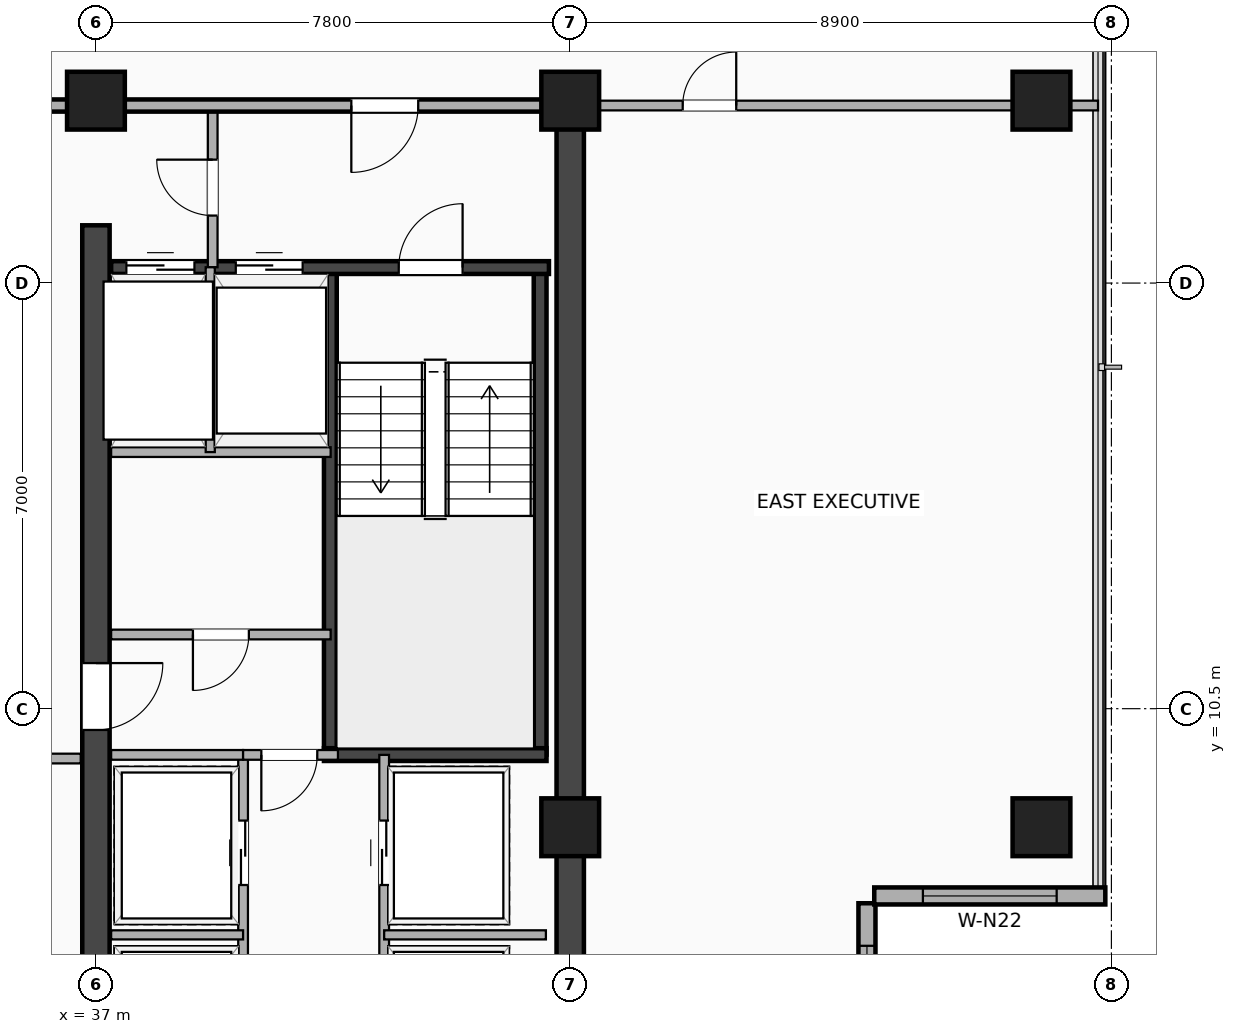
"""IFC4 building model, lengths in metres.
Left out: names, types, materials, properties, quantities, classifications, styles, units other than length and angle.
Written with IfcOpenShell. Run it as: python <this file> out.ifc"""

import sys

from ifc_helpers import new_model, si_unit, direction, frame, frame_2d, origin, origin_2d, place, context, subcontext, project, spatial, rectangle, extrude, element, fill, save


model = new_model("IFC4")
c1 = context("Model", 3, precision=1e-05, world=origin(), true_north=direction((0.0, 1.0)))
c2 = subcontext(c1, "Body", "Model", "MODEL_VIEW")
j1 = project(units=[si_unit("LENGTHUNIT", "METRE"), si_unit("PLANEANGLEUNIT", "RADIAN")], contexts=[c1])
p1 = place(None, origin())
s1 = spatial("IfcSite", under=j1, at=p1, CompositionType="ELEMENT")
p2 = place(p1, origin())
s2 = spatial("IfcBuilding", under=s1, at=p2, CompositionType="ELEMENT")
p3 = place(p2, frame((0.0, 0.0, 224.9)))
s3 = spatial("IfcBuildingStorey", under=s2, at=p3, CompositionType="ELEMENT", Elevation=224.9)
p4 = place(p3, frame((44.8, 3.5, 0.0), z_axis=(0.0, 0.0, 1.0), x_axis=(0.0, 1.0, 0.0)))
e1 = element("IfcWall", 1, at=p4, inside=s3, PredefinedType="SHEAR", context=c2, shape_type="SweptSolid", body=[
    extrude(rectangle(XDim=16.9, YDim=0.45, at=frame_2d((8.45, 0.0))), origin(), (0.0, 0.0, 1.0), 3.26),
])
p5 = place(p3, frame((37.0, 3.5, 0.0), z_axis=(0.0, 0.0, 1.0), x_axis=(0.0, 1.0, 0.0)))
e2 = element("IfcWall", 2, at=p5, inside=s3, PredefinedType="SHEAR", context=c2, shape_type="SweptSolid", body=[
    extrude(rectangle(XDim=14.95, YDim=0.45, at=frame_2d((7.475, 0.0))), origin(), (0.0, 0.0, 1.0), 3.26),
])
p6 = place(p5, frame((6.65, 0.0, 0.0)))
e3 = element("IfcOpeningElement", 3, at=p6, cuts=e2, PredefinedType="OPENING", context=c2, shape_type="SweptSolid", body=[
    extrude(rectangle(XDim=1.1, YDim=2.15, at=frame_2d((0.55, 1.075))), frame((0.0, 0.235, 0.0), z_axis=(0.0, -1.0, 0.0), x_axis=(1.0, 0.0, 0.0)), (0.0, 0.0, 1.0), 0.47),
])
for number, where, z_axis, x_axis in (
    (4, (40.855, 9.745, 0.0), (0.0, 0.0, 1.0), (0.0, 1.0, 0.0)),
    (5, (44.305, 9.745, 0.0), (0.0, 0.0, 1.0), (0.0, 1.0, 0.0)),
):
    element("IfcWall", number, at=place(p3, frame(where, z_axis=z_axis, x_axis=x_axis)), inside=s3, PredefinedType="SHEAR", context=c2, shape_type="SweptSolid", body=[
        extrude(rectangle(XDim=8.01, YDim=0.21, at=frame_2d((4.005, 0.0))), origin(), (0.0, 0.0, 1.0), 3.26),
    ])
p7 = place(p3, frame((40.75, 9.745, 0.0), z_axis=(0.0, 0.0, 1.0), x_axis=(1.0, 0.0, 0.0)))
e6 = element("IfcWall", 6, at=p7, inside=s3, PredefinedType="SHEAR", context=c2, shape_type="SweptSolid", body=[
    extrude(rectangle(XDim=3.66, YDim=0.21, at=frame_2d((1.83, 0.0))), origin(), (0.0, 0.0, 1.0), 3.26),
])
p8 = place(p3, frame((37.25, 17.755, 0.0), z_axis=(0.0, 0.0, 1.0), x_axis=(1.0, 0.0, 0.0)))
e7 = element("IfcWall", 7, at=p8, inside=s3, PredefinedType="SHEAR", context=c2, shape_type="SweptSolid", body=[
    extrude(rectangle(XDim=7.2, YDim=0.21, at=frame_2d((3.6, 0.0))), origin(), (0.0, 0.0, 1.0), 3.26),
])
p9 = place(p8, frame((0.25, 0.0, 0.0)))
e8 = element("IfcOpeningElement", 8, at=p9, cuts=e7, PredefinedType="OPENING", context=c2, shape_type="SweptSolid", body=[
    extrude(rectangle(XDim=1.12, YDim=2.2, at=frame_2d((0.56, 1.1))), frame((0.0, 0.115, 0.0), z_axis=(0.0, -1.0, 0.0), x_axis=(1.0, 0.0, 0.0)), (0.0, 0.0, 1.0), 0.23),
])
p10 = place(p8, frame((2.05, 0.0, 0.0)))
e9 = element("IfcOpeningElement", 9, at=p10, cuts=e7, PredefinedType="OPENING", context=c2, shape_type="SweptSolid", body=[
    extrude(rectangle(XDim=1.1, YDim=2.18, at=frame_2d((0.55, 1.09))), frame((0.0, 0.115, 0.0), z_axis=(0.0, -1.0, 0.0), x_axis=(1.0, 0.0, 0.0)), (0.0, 0.0, 1.0), 0.23),
])
p11 = place(p8, frame((5.78, 0.0, 0.0), z_axis=(0.0, 0.0, 1.0), x_axis=(-1.0, 0.0, 0.0)))
e10 = element("IfcOpeningElement", 10, at=p11, cuts=e7, PredefinedType="OPENING", context=c2, shape_type="SweptSolid", body=[
    extrude(rectangle(XDim=1.05, YDim=2.15, at=frame_2d((0.525, 1.075))), frame((0.0, 0.115, 0.0), z_axis=(0.0, -1.0, 0.0), x_axis=(1.0, 0.0, 0.0)), (0.0, 0.0, 1.0), 0.23),
])
for number, where, z_axis, x_axis in (
    (11, (44.8, 8.55, -0.24), (0.0, 0.0, 1.0), (1.0, 0.0, 0.0)),
    (12, (37.0, 20.5, -0.24), (0.0, 0.0, 1.0), (1.0, 0.0, 0.0)),
    (13, (44.8, 20.5, -0.24), (0.0, 0.0, 1.0), (1.0, 0.0, 0.0)),
    (14, (52.55, 8.55, -0.24), (0.0, 0.0, 1.0), (1.0, 0.0, 0.0)),
    (15, (52.55, 20.5, -0.24), (0.0, 0.0, 1.0), (1.0, 0.0, 0.0)),
):
    element("IfcColumn", number, at=place(p3, frame(where, z_axis=z_axis, x_axis=x_axis)), inside=s3, PredefinedType="COLUMN", context=c2, shape_type="SweptSolid", body=[
        extrude(rectangle(XDim=0.95, YDim=0.95, at=origin_2d()), origin(), (0.0, 0.0, 1.0), 3.5),
    ])
p12 = place(p3, frame((49.68, 3.5, 0.0), z_axis=(0.0, 0.0, 1.0), x_axis=(0.0, 1.0, 0.0)))
e16 = element("IfcWall", 16, at=p12, inside=s3, PredefinedType="SOLIDWALL", context=c2, shape_type="SweptSolid", body=[
    extrude(rectangle(XDim=3.8, YDim=0.28, at=frame_2d((1.9, 0.0))), origin(), (0.0, 0.0, 1.0), 3.26),
])
p13 = place(p12, frame((0.7, 0.0, 0.85)))
e17 = element("IfcOpeningElement", 17, at=p13, cuts=e16, PredefinedType="OPENING", context=c2, shape_type="SweptSolid", body=[
    extrude(rectangle(XDim=2.4, YDim=1.65, at=frame_2d((1.2, 0.825))), frame((0.0, 0.15, 0.0), z_axis=(0.0, -1.0, 0.0), x_axis=(1.0, 0.0, 0.0)), (0.0, 0.0, 1.0), 0.3),
])
p14 = place(p3, frame((49.8, 7.42, 0.0), z_axis=(0.0, 0.0, 1.0), x_axis=(1.0, 0.0, 0.0)))
e18 = element("IfcWall", 18, at=p14, inside=s3, PredefinedType="SOLIDWALL", context=c2, shape_type="SweptSolid", body=[
    extrude(rectangle(XDim=3.8, YDim=0.28, at=frame_2d((1.9, 0.0))), origin(), (0.0, 0.0, 1.0), 3.26),
])
p15 = place(p14, frame((0.8, 0.0, 0.85)))
e19 = element("IfcOpeningElement", 19, at=p15, cuts=e18, PredefinedType="OPENING", context=c2, shape_type="SweptSolid", body=[
    extrude(rectangle(XDim=2.2, YDim=1.65, at=frame_2d((1.1, 0.825))), frame((0.0, 0.15, 0.0), z_axis=(0.0, -1.0, 0.0), x_axis=(1.0, 0.0, 0.0)), (0.0, 0.0, 1.0), 0.3),
])
p16 = place(p3, frame((38.92, 17.76, 0.0), z_axis=(0.0, 0.0, 1.0), x_axis=(0.0, 1.0, 0.0)))
e20 = element("IfcWall", 20, at=p16, inside=s3, PredefinedType="PARTITIONING", context=c2, shape_type="SweptSolid", body=[
    extrude(rectangle(XDim=2.66, YDim=0.16, at=frame_2d((1.33, 0.0))), origin(), (0.0, 0.0, 1.0), 2.706),
])
p17 = place(p16, frame((1.77, 0.0, 0.0), z_axis=(0.0, 0.0, 1.0), x_axis=(-1.0, 0.0, 0.0)))
e21 = element("IfcOpeningElement", 21, at=p17, cuts=e20, PredefinedType="OPENING", context=c2, shape_type="SweptSolid", body=[
    extrude(rectangle(XDim=0.92, YDim=2.08, at=frame_2d((0.46, 1.04))), frame((0.0, 0.09, 0.0), z_axis=(0.0, -1.0, 0.0), x_axis=(1.0, 0.0, 0.0)), (0.0, 0.0, 1.0), 0.18),
])
p18 = place(p3, frame((37.25, 14.72, 0.0), z_axis=(0.0, 0.0, 1.0), x_axis=(1.0, 0.0, 0.0)))
e22 = element("IfcWall", 22, at=p18, inside=s3, PredefinedType="PARTITIONING", context=c2, shape_type="SweptSolid", body=[
    extrude(rectangle(XDim=3.61, YDim=0.16, at=frame_2d((1.805, 0.0))), origin(), (0.0, 0.0, 1.0), 3.26),
])
p19 = place(p3, frame((38.88, 14.72, 0.0), z_axis=(0.0, 0.0, 1.0), x_axis=(0.0, 1.0, 0.0)))
e23 = element("IfcWall", 23, at=p19, inside=s3, PredefinedType="PARTITIONING", context=c2, shape_type="SweptSolid", body=[
    extrude(rectangle(XDim=3.04, YDim=0.15, at=frame_2d((1.52, 0.0))), origin(), (0.0, 0.0, 1.0), 3.26),
])
p20 = place(p3, frame((29.2, 20.42, 0.0), z_axis=(0.0, 0.0, 1.0), x_axis=(1.0, 0.0, 0.0)))
e24 = element("IfcWall", 24, at=p20, inside=s3, PredefinedType="PARTITIONING", context=c2, shape_type="SweptSolid", body=[
    extrude(rectangle(XDim=7.8, YDim=0.2, at=frame_2d((3.9, 0.0))), origin(), (0.0, 0.0, 1.0), 2.472),
])
p21 = place(p20, frame((3.409, 0.0, 0.0)))
e25 = element("IfcOpeningElement", 25, at=p21, cuts=e24, PredefinedType="OPENING", context=c2, shape_type="SweptSolid", body=[
    extrude(rectangle(XDim=1.1, YDim=2.15, at=frame_2d((0.55, 1.075))), frame((0.0, 0.11, 0.0), z_axis=(0.0, -1.0, 0.0), x_axis=(1.0, 0.0, 0.0)), (0.0, 0.0, 1.0), 0.22),
])
p22 = place(p3, frame((37.0, 20.42, 0.0), z_axis=(0.0, 0.0, 1.0), x_axis=(1.0, 0.0, 0.0)))
e26 = element("IfcWall", 26, at=p22, inside=s3, PredefinedType="PARTITIONING", context=c2, shape_type="SweptSolid", body=[
    extrude(rectangle(XDim=7.45, YDim=0.2, at=frame_2d((3.725, 0.0))), origin(), (0.0, 0.0, 1.0), 2.472),
])
p23 = place(p22, frame((4.2, 0.0, 0.0)))
e27 = element("IfcOpeningElement", 27, at=p23, cuts=e26, PredefinedType="OPENING", context=c2, shape_type="SweptSolid", body=[
    extrude(rectangle(XDim=1.1, YDim=2.15, at=frame_2d((0.55, 1.075))), frame((0.0, 0.11, 0.0), z_axis=(0.0, -1.0, 0.0), x_axis=(1.0, 0.0, 0.0)), (0.0, 0.0, 1.0), 0.22),
])
p24 = place(p3, frame((37.25, 11.72, 0.0), z_axis=(0.0, 0.0, 1.0), x_axis=(1.0, 0.0, 0.0)))
e28 = element("IfcWall", 28, at=p24, inside=s3, PredefinedType="PARTITIONING", context=c2, shape_type="SweptSolid", body=[
    extrude(rectangle(XDim=3.61, YDim=0.16, at=frame_2d((1.805, 0.0))), origin(), (0.0, 0.0, 1.0), 3.26),
])
p25 = place(p24, frame((1.345, 0.0, 0.0)))
e29 = element("IfcOpeningElement", 29, at=p25, cuts=e28, PredefinedType="OPENING", context=c2, shape_type="SweptSolid", body=[
    extrude(rectangle(XDim=0.92, YDim=2.08, at=frame_2d((0.46, 1.04))), frame((0.0, 0.09, 0.0), z_axis=(0.0, -1.0, 0.0), x_axis=(1.0, 0.0, 0.0)), (0.0, 0.0, 1.0), 0.18),
])
p26 = place(p3, frame((39.42, 3.9, 0.0), z_axis=(0.0, 0.0, 1.0), x_axis=(0.0, 1.0, 0.0)))
e30 = element("IfcWall", 30, at=p26, inside=s3, PredefinedType="PARTITIONING", context=c2, shape_type="SweptSolid", body=[
    extrude(rectangle(XDim=5.84, YDim=0.16, at=frame_2d((2.92, 0.0))), origin(), (0.0, 0.0, 1.0), 3.26),
])
p27 = place(p26, frame((1.86, 0.0, 0.0), z_axis=(0.0, 0.0, 1.0), x_axis=(-1.0, 0.0, 0.0)))
e31 = element("IfcOpeningElement", 31, at=p27, cuts=e30, PredefinedType="OPENING", context=c2, shape_type="SweptSolid", body=[
    extrude(rectangle(XDim=1.06, YDim=2.16, at=frame_2d((0.53, 1.08))), frame((0.0, 0.09, 0.0), z_axis=(0.0, -1.0, 0.0), x_axis=(1.0, 0.0, 0.0)), (0.0, 0.0, 1.0), 0.18),
])
p28 = place(p26, frame((4.76, 0.0, 0.0), z_axis=(0.0, 0.0, 1.0), x_axis=(-1.0, 0.0, 0.0)))
e32 = element("IfcOpeningElement", 32, at=p28, cuts=e30, PredefinedType="OPENING", context=c2, shape_type="SweptSolid", body=[
    extrude(rectangle(XDim=1.06, YDim=2.16, at=frame_2d((0.53, 1.08))), frame((0.0, 0.09, 0.0), z_axis=(0.0, -1.0, 0.0), x_axis=(1.0, 0.0, 0.0)), (0.0, 0.0, 1.0), 0.18),
])
p29 = place(p3, frame((41.74, 3.9, 0.0), z_axis=(0.0, 0.0, 1.0), x_axis=(0.0, 1.0, 0.0)))
e33 = element("IfcWall", 33, at=p29, inside=s3, PredefinedType="PARTITIONING", context=c2, shape_type="SweptSolid", body=[
    extrude(rectangle(XDim=5.84, YDim=0.16, at=frame_2d((2.92, 0.0))), origin(), (0.0, 0.0, 1.0), 3.26),
])
p30 = place(p29, frame((0.8, 0.0, 0.0)))
e34 = element("IfcOpeningElement", 34, at=p30, cuts=e33, PredefinedType="OPENING", context=c2, shape_type="SweptSolid", body=[
    extrude(rectangle(XDim=1.06, YDim=2.16, at=frame_2d((0.53, 1.08))), frame((0.0, 0.09, 0.0), z_axis=(0.0, -1.0, 0.0), x_axis=(1.0, 0.0, 0.0)), (0.0, 0.0, 1.0), 0.18),
])
p31 = place(p29, frame((3.7, 0.0, 0.0)))
e35 = element("IfcOpeningElement", 35, at=p31, cuts=e33, PredefinedType="OPENING", context=c2, shape_type="SweptSolid", body=[
    extrude(rectangle(XDim=1.06, YDim=2.16, at=frame_2d((0.53, 1.08))), frame((0.0, 0.09, 0.0), z_axis=(0.0, -1.0, 0.0), x_axis=(1.0, 0.0, 0.0)), (0.0, 0.0, 1.0), 0.18),
])
p32 = place(p3, frame((37.25, 6.78, 0.0), z_axis=(0.0, 0.0, 1.0), x_axis=(1.0, 0.0, 0.0)))
e36 = element("IfcWall", 36, at=p32, inside=s3, PredefinedType="PARTITIONING", context=c2, shape_type="SweptSolid", body=[
    extrude(rectangle(XDim=2.17, YDim=0.15, at=frame_2d((1.085, 0.0))), origin(), (0.0, 0.0, 1.0), 3.26),
])
p33 = place(p3, frame((41.74, 6.78, 0.0), z_axis=(0.0, 0.0, 1.0), x_axis=(1.0, 0.0, 0.0)))
e37 = element("IfcWall", 37, at=p33, inside=s3, PredefinedType="PARTITIONING", context=c2, shape_type="SweptSolid", body=[
    extrude(rectangle(XDim=2.66, YDim=0.15, at=frame_2d((1.33, 0.0))), origin(), (0.0, 0.0, 1.0), 2.472),
])
p34 = place(p3, frame((37.25, 9.74, 0.0), z_axis=(0.0, 0.0, 1.0), x_axis=(1.0, 0.0, 0.0)))
e38 = element("IfcWall", 38, at=p34, inside=s3, PredefinedType="PARTITIONING", context=c2, shape_type="SweptSolid", body=[
    extrude(rectangle(XDim=2.17, YDim=0.16, at=frame_2d((1.085, 0.0))), origin(), (0.0, 0.0, 1.0), 3.26),
])
p35 = place(p3, frame((39.42, 9.74, 0.0), z_axis=(0.0, 0.0, 1.0), x_axis=(1.0, 0.0, 0.0)))
e39 = element("IfcWall", 39, at=p35, inside=s3, PredefinedType="PARTITIONING", context=c2, shape_type="SweptSolid", body=[
    extrude(rectangle(XDim=1.56, YDim=0.16, at=frame_2d((0.78, 0.0))), origin(), (0.0, 0.0, 1.0), 3.26),
])
p36 = place(p35, frame((0.3, 0.0, 0.0)))
e40 = element("IfcOpeningElement", 40, at=p36, cuts=e39, PredefinedType="OPENING", context=c2, shape_type="SweptSolid", body=[
    extrude(rectangle(XDim=0.92, YDim=2.08, at=frame_2d((0.46, 1.04))), frame((0.0, 0.09, 0.0), z_axis=(0.0, -1.0, 0.0), x_axis=(1.0, 0.0, 0.0)), (0.0, 0.0, 1.0), 0.18),
])
p37 = place(p3, frame((34.341, 9.68, 0.0), z_axis=(0.0, 0.0, 1.0), x_axis=(1.0, 0.0, 0.0)))
e41 = element("IfcWall", 41, at=p37, inside=s3, PredefinedType="PARTITIONING", context=c2, shape_type="SweptSolid", body=[
    extrude(rectangle(XDim=2.409, YDim=0.16, at=frame_2d((1.205, 0.0))), origin(), (0.0, 0.0, 1.0), 3.26),
])
p38 = place(p37, frame((1.664, 0.0, 0.0), z_axis=(0.0, 0.0, 1.0), x_axis=(-1.0, 0.0, 0.0)))
e42 = element("IfcOpeningElement", 42, at=p38, cuts=e41, PredefinedType="OPENING", context=c2, shape_type="SweptSolid", body=[
    extrude(rectangle(XDim=0.92, YDim=2.08, at=frame_2d((0.46, 1.04))), frame((0.0, 0.09, 0.0), z_axis=(0.0, -1.0, 0.0), x_axis=(1.0, 0.0, 0.0)), (0.0, 0.0, 1.0), 0.18),
])
p39 = place(p3, frame((44.8, 20.42, 0.0), z_axis=(0.0, 0.0, 1.0), x_axis=(1.0, 0.0, 0.0)))
e43 = element("IfcWall", 43, at=p39, inside=s3, PredefinedType="PARTITIONING", context=c2, shape_type="SweptSolid", body=[
    extrude(rectangle(XDim=8.68, YDim=0.16, at=frame_2d((4.34, 0.0))), origin(), (0.0, 0.0, 1.0), 2.472),
])
p40 = place(p39, frame((2.73, 0.0, 0.0), z_axis=(0.0, 0.0, 1.0), x_axis=(-1.0, 0.0, 0.0)))
e44 = element("IfcOpeningElement", 44, at=p40, cuts=e43, PredefinedType="OPENING", context=c2, shape_type="SweptSolid", body=[
    extrude(rectangle(XDim=0.88, YDim=2.08, at=frame_2d((0.44, 1.04))), frame((0.0, 0.09, 0.0), z_axis=(0.0, -1.0, 0.0), x_axis=(1.0, 0.0, 0.0)), (0.0, 0.0, 1.0), 0.18),
])
p41 = place(p13, origin())
e45 = element("IfcWindow", 45, at=p41, inside=s3, PartitioningType="SINGLE_PANEL", PredefinedType="WINDOW", context=c2, shape_type="SweptSolid", body=[
    extrude(rectangle(XDim=2.4, YDim=1.65, at=frame_2d((1.2, 0.825))), frame((0.0, 0.03, 0.0), z_axis=(0.0, -1.0, 0.0), x_axis=(1.0, 0.0, 0.0)), (0.0, 0.0, 1.0), 0.06),
])
fill(e17, e45)
p42 = place(p15, origin())
e46 = element("IfcWindow", 46, at=p42, inside=s3, PartitioningType="SINGLE_PANEL", PredefinedType="WINDOW", context=c2, shape_type="SweptSolid", body=[
    extrude(rectangle(XDim=2.2, YDim=1.65, at=frame_2d((1.1, 0.825))), frame((0.0, 0.03, 0.0), z_axis=(0.0, -1.0, 0.0), x_axis=(1.0, 0.0, 0.0)), (0.0, 0.0, 1.0), 0.06),
])
fill(e19, e46)
p43 = place(p9, origin())
e47 = element("IfcDoor", 47, at=p43, inside=s3, OperationType="DOUBLE_DOOR_SLIDING", PredefinedType="DOOR", context=c2, shape_type="SweptSolid", body=[
    extrude(rectangle(XDim=1.12, YDim=2.2, at=frame_2d((0.56, 1.1))), frame((0.0, 0.025, 0.0), z_axis=(0.0, -1.0, 0.0), x_axis=(1.0, 0.0, 0.0)), (0.0, 0.0, 1.0), 0.05),
])
fill(e8, e47)
p44 = place(p10, origin())
e48 = element("IfcDoor", 48, at=p44, inside=s3, OperationType="DOUBLE_DOOR_SLIDING", PredefinedType="DOOR", context=c2, shape_type="SweptSolid", body=[
    extrude(rectangle(XDim=1.1, YDim=2.18, at=frame_2d((0.55, 1.09))), frame((0.0, 0.025, 0.0), z_axis=(0.0, -1.0, 0.0), x_axis=(1.0, 0.0, 0.0)), (0.0, 0.0, 1.0), 0.05),
])
fill(e9, e48)
p45 = place(p11, origin())
e49 = element("IfcDoor", 49, at=p45, inside=s3, OperationType="SINGLE_SWING_RIGHT", PredefinedType="DOOR", context=c2, shape_type="SweptSolid", body=[
    extrude(rectangle(XDim=1.05, YDim=2.15, at=frame_2d((0.525, 1.075))), frame((0.0, 0.025, 0.0), z_axis=(0.0, -1.0, 0.0), x_axis=(1.0, 0.0, 0.0)), (0.0, 0.0, 1.0), 0.05),
])
fill(e10, e49)
p46 = place(p6, origin())
e50 = element("IfcDoor", 50, at=p46, inside=s3, OperationType="SINGLE_SWING_RIGHT", PredefinedType="DOOR", context=c2, shape_type="SweptSolid", body=[
    extrude(rectangle(XDim=1.1, YDim=2.15, at=frame_2d((0.55, 1.075))), frame((0.0, 0.025, 0.0), z_axis=(0.0, -1.0, 0.0), x_axis=(1.0, 0.0, 0.0)), (0.0, 0.0, 1.0), 0.05),
])
fill(e3, e50)
p47 = place(p17, origin())
e51 = element("IfcDoor", 51, at=p47, inside=s3, OperationType="SINGLE_SWING_RIGHT", PredefinedType="DOOR", context=c2, shape_type="SweptSolid", body=[
    extrude(rectangle(XDim=0.92, YDim=2.08, at=frame_2d((0.46, 1.04))), frame((0.0, 0.025, 0.0), z_axis=(0.0, -1.0, 0.0), x_axis=(1.0, 0.0, 0.0)), (0.0, 0.0, 1.0), 0.05),
])
fill(e21, e51)
p48 = place(p23, origin())
e52 = element("IfcDoor", 52, at=p48, inside=s3, OperationType="SINGLE_SWING_LEFT", PredefinedType="DOOR", context=c2, shape_type="SweptSolid", body=[
    extrude(rectangle(XDim=1.1, YDim=2.15, at=frame_2d((0.55, 1.075))), frame((0.0, 0.025, 0.0), z_axis=(0.0, -1.0, 0.0), x_axis=(1.0, 0.0, 0.0)), (0.0, 0.0, 1.0), 0.05),
])
fill(e27, e52)
p49 = place(p25, origin())
e53 = element("IfcDoor", 53, at=p49, inside=s3, OperationType="SINGLE_SWING_LEFT", PredefinedType="DOOR", context=c2, shape_type="SweptSolid", body=[
    extrude(rectangle(XDim=0.92, YDim=2.08, at=frame_2d((0.46, 1.04))), frame((0.0, 0.025, 0.0), z_axis=(0.0, -1.0, 0.0), x_axis=(1.0, 0.0, 0.0)), (0.0, 0.0, 1.0), 0.05),
])
fill(e29, e53)
p50 = place(p28, origin())
e54 = element("IfcDoor", 54, at=p50, inside=s3, OperationType="DOUBLE_DOOR_SLIDING", PredefinedType="DOOR", context=c2, shape_type="SweptSolid", body=[
    extrude(rectangle(XDim=1.06, YDim=2.16, at=frame_2d((0.53, 1.08))), frame((0.0, 0.025, 0.0), z_axis=(0.0, -1.0, 0.0), x_axis=(1.0, 0.0, 0.0)), (0.0, 0.0, 1.0), 0.05),
])
fill(e32, e54)
p51 = place(p31, origin())
e55 = element("IfcDoor", 55, at=p51, inside=s3, OperationType="DOUBLE_DOOR_SLIDING", PredefinedType="DOOR", context=c2, shape_type="SweptSolid", body=[
    extrude(rectangle(XDim=1.06, YDim=2.16, at=frame_2d((0.53, 1.08))), frame((0.0, 0.025, 0.0), z_axis=(0.0, -1.0, 0.0), x_axis=(1.0, 0.0, 0.0)), (0.0, 0.0, 1.0), 0.05),
])
fill(e35, e55)
p52 = place(p36, origin())
e56 = element("IfcDoor", 56, at=p52, inside=s3, OperationType="SINGLE_SWING_LEFT", PredefinedType="DOOR", context=c2, shape_type="SweptSolid", body=[
    extrude(rectangle(XDim=0.92, YDim=2.08, at=frame_2d((0.46, 1.04))), frame((0.0, 0.025, 0.0), z_axis=(0.0, -1.0, 0.0), x_axis=(1.0, 0.0, 0.0)), (0.0, 0.0, 1.0), 0.05),
])
fill(e40, e56)
p53 = place(p40, origin())
e57 = element("IfcDoor", 57, at=p53, inside=s3, OperationType="SINGLE_SWING_RIGHT", PredefinedType="DOOR", context=c2, shape_type="SweptSolid", body=[
    extrude(rectangle(XDim=0.88, YDim=2.08, at=frame_2d((0.44, 1.04))), frame((0.0, 0.025, 0.0), z_axis=(0.0, -1.0, 0.0), x_axis=(1.0, 0.0, 0.0)), (0.0, 0.0, 1.0), 0.05),
])
fill(e44, e57)
save(model, sys.argv[1])
